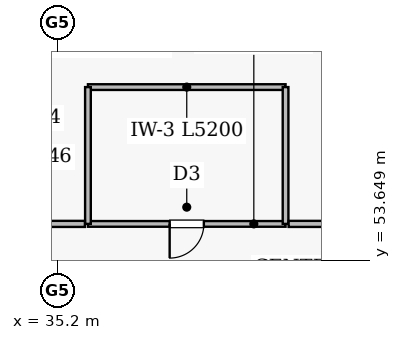
"""IFC4 building model, lengths in metres.
Left out: names, types, materials, properties, quantities, classifications, styles, units other than length and angle.
Written with IfcOpenShell. Run it as: python <this file> out.ifc"""

import sys

from ifc_helpers import new_model, si_unit, direction, frame, frame_2d, origin, place, context, subcontext, project, spatial, rectangle, extrude, element, fill, save


model = new_model("IFC4")
c1 = context("Model", 3, precision=1e-05, world=origin(), true_north=direction((0.0, 1.0)))
c2 = subcontext(c1, "Body", "Model", "MODEL_VIEW")
j1 = project(units=[si_unit("LENGTHUNIT", "METRE"), si_unit("PLANEANGLEUNIT", "RADIAN")], contexts=[c1])
p1 = place(None, origin())
s1 = spatial("IfcSite", under=j1, at=p1, CompositionType="ELEMENT")
p2 = place(p1, origin())
s2 = spatial("IfcBuilding", under=s1, at=p2, CompositionType="ELEMENT")
p3 = place(p2, frame((0.0, 0.0, 189.8)))
s3 = spatial("IfcBuildingStorey", under=s2, at=p3, CompositionType="ELEMENT", Elevation=189.8)
p4 = place(p3, frame((36.914, 61.625, 0.0), z_axis=(0.0, 0.0, 1.0), x_axis=(-0.623573825008, -0.781764468856, 0.0)))
e1 = element("IfcWall", 1, at=p4, inside=s3, PredefinedType="SOLIDWALL", context=c2, shape_type="SweptSolid", body=[
    extrude(rectangle(XDim=4.065, YDim=0.27, at=frame_2d((2.033, 0.0))), origin(), (0.0, 0.0, 1.0), 4.345),
])
p5 = place(p4, frame((0.982, 0.0, 0.8)))
e2 = element("IfcOpeningElement", 2, at=p5, cuts=e1, PredefinedType="OPENING", context=c2, shape_type="SweptSolid", body=[
    extrude(rectangle(XDim=2.1, YDim=1.7, at=frame_2d((1.05, 0.85))), frame((0.0, 0.145, 0.0), z_axis=(0.0, -1.0, 0.0), x_axis=(1.0, 0.0, 0.0)), (0.0, 0.0, 1.0), 0.29),
])
p6 = place(p3, frame((41.2, 54.6, 0.0), z_axis=(0.0, 0.0, 1.0), x_axis=(-1.0, 0.0, 0.0)))
e3 = element("IfcWall", 3, at=p6, inside=s3, PredefinedType="PLUMBINGWALL", context=c2, shape_type="SweptSolid", body=[
    extrude(rectangle(XDim=5.2, YDim=0.15, at=frame_2d((2.6, 0.0))), origin(), (0.0, 0.0, 1.0), 3.533),
])
p7 = place(p6, frame((2.15, 0.0, 0.0)))
e4 = element("IfcOpeningElement", 4, at=p7, cuts=e3, PredefinedType="OPENING", context=c2, shape_type="SweptSolid", body=[
    extrude(rectangle(XDim=0.9, YDim=2.1, at=frame_2d((0.45, 1.05))), frame((0.0, 0.085, 0.0), z_axis=(0.0, -1.0, 0.0), x_axis=(1.0, 0.0, 0.0)), (0.0, 0.0, 1.0), 0.17),
])
p8 = place(p3, frame((41.2, 58.2, 0.0), z_axis=(0.0, 0.0, 1.0), x_axis=(-1.0, 0.0, 0.0)))
e5 = element("IfcWall", 5, at=p8, inside=s3, PredefinedType="PLUMBINGWALL", context=c2, shape_type="SweptSolid", body=[
    extrude(rectangle(XDim=5.2, YDim=0.15, at=frame_2d((2.6, 0.0))), origin(), (0.0, 0.0, 1.0), 4.345),
])
p9 = place(p3, frame((41.2, 54.6, 0.0), z_axis=(0.0, 0.0, 1.0), x_axis=(0.0, 1.0, 0.0)))
e6 = element("IfcWall", 6, at=p9, inside=s3, PredefinedType="PLUMBINGWALL", context=c2, shape_type="SweptSolid", body=[
    extrude(rectangle(XDim=3.6, YDim=0.15, at=frame_2d((1.8, 0.0))), origin(), (0.0, 0.0, 1.0), 3.533),
])
p10 = place(p3, frame((36.0, 58.2, 0.0), z_axis=(0.0, 0.0, 1.0), x_axis=(0.0, -1.0, 0.0)))
e7 = element("IfcWall", 7, at=p10, inside=s3, PredefinedType="PLUMBINGWALL", context=c2, shape_type="SweptSolid", body=[
    extrude(rectangle(XDim=3.6, YDim=0.15, at=frame_2d((1.8, 0.0))), origin(), (0.0, 0.0, 1.0), 4.345),
])
p11 = place(p3, frame((43.92, 54.6, 0.0), z_axis=(0.0, 0.0, 1.0), x_axis=(-1.0, 0.0, 0.0)))
e8 = element("IfcWall", 8, at=p11, inside=s3, PredefinedType="SOLIDWALL", context=c2, shape_type="SweptSolid", body=[
    extrude(rectangle(XDim=2.64, YDim=0.16, at=frame_2d((1.32, 0.0))), origin(), (0.0, 0.0, 1.0), 3.533),
])
p12 = place(p3, frame((35.92, 54.6, 0.0), z_axis=(0.0, 0.0, 1.0), x_axis=(-1.0, 0.0, 0.0)))
e9 = element("IfcWall", 9, at=p12, inside=s3, PredefinedType="SOLIDWALL", context=c2, shape_type="SweptSolid", body=[
    extrude(rectangle(XDim=2.44, YDim=0.16, at=frame_2d((1.22, 0.0))), origin(), (0.0, 0.0, 1.0), 4.345),
])
p13 = place(p7, origin())
e10 = element("IfcDoor", 10, at=p13, inside=s3, OperationType="SINGLE_SWING_RIGHT", PredefinedType="DOOR", context=c2, shape_type="SweptSolid", body=[
    extrude(rectangle(XDim=0.9, YDim=2.1, at=frame_2d((0.45, 1.05))), frame((0.0, 0.025, 0.0), z_axis=(0.0, -1.0, 0.0), x_axis=(1.0, 0.0, 0.0)), (0.0, 0.0, 1.0), 0.05),
])
fill(e4, e10)
save(model, sys.argv[1])
